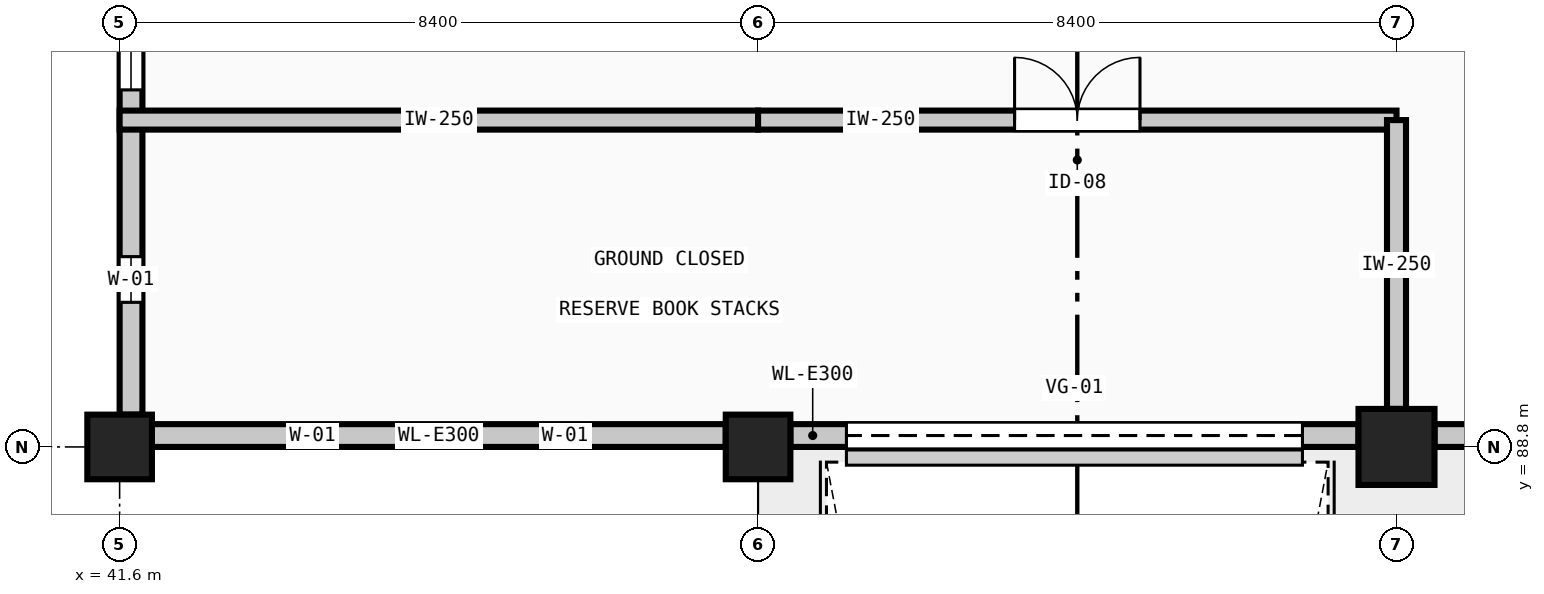
"""IFC4 building model, lengths in metres.
Left out: names, types, materials, properties, quantities, classifications, styles, units other than length and angle.
Written with IfcOpenShell. Run it as: python <this file> out.ifc"""

import sys

from ifc_helpers import new_model, si_unit, direction, frame, frame_2d, origin, origin_2d, place, context, subcontext, project, spatial, rectangle, extrude, element, fill, save


model = new_model("IFC4")
c1 = context("Model", 3, precision=1e-05, world=origin(), true_north=direction((0.0, 1.0)))
c2 = subcontext(c1, "Body", "Model", "MODEL_VIEW")
j1 = project(units=[si_unit("LENGTHUNIT", "METRE"), si_unit("PLANEANGLEUNIT", "RADIAN")], contexts=[c1])
p1 = place(None, origin())
s1 = spatial("IfcSite", under=j1, at=p1, CompositionType="ELEMENT")
p2 = place(p1, origin())
s2 = spatial("IfcBuilding", under=s1, at=p2, CompositionType="ELEMENT")
p3 = place(p2, origin())
s3 = spatial("IfcBuildingStorey", under=s2, at=p3, CompositionType="ELEMENT", Elevation=0.0)
for number, where, z_axis, x_axis in (
    (1, (41.6, 88.8, 0.0), (0.0, 0.0, 1.0), (1.0, 0.0, 0.0)),
    (2, (50.0, 88.8, 0.0), (0.0, 0.0, 1.0), (1.0, 0.0, 0.0)),
):
    element("IfcColumn", number, at=place(p3, frame(where, z_axis=z_axis, x_axis=x_axis)), inside=s3, PredefinedType="COLUMN", context=c2, shape_type="SweptSolid", body=[
        extrude(rectangle(XDim=0.85, YDim=0.85, at=origin_2d()), origin(), (0.0, 0.0, 1.0), 4.8),
    ])
p4 = place(p3, frame((58.4, 88.8, 0.0), z_axis=(0.0, 0.0, 1.0), x_axis=(1.0, 0.0, 0.0)))
e3 = element("IfcColumn", 3, at=p4, inside=s3, PredefinedType="COLUMN", context=c2, shape_type="SweptSolid", body=[
    extrude(rectangle(XDim=1.0, YDim=1.0, at=origin_2d()), origin(), (0.0, 0.0, 1.0), 4.8),
])
p5 = place(p3, frame((66.3, 88.95, 0.0), z_axis=(0.0, 0.0, 1.0), x_axis=(-1.0, 0.0, 0.0)))
e4 = element("IfcWall", 4, at=p5, inside=s3, PredefinedType="SOLIDWALL", context=c2, shape_type="SweptSolid", body=[
    extrude(rectangle(XDim=7.4, YDim=0.3, at=frame_2d((3.7, 0.0))), origin(), (0.0, 0.0, 1.0), 3.85),
])
p6 = place(p5, frame((1.772, 0.0, 0.9)))
e5 = element("IfcOpeningElement", 5, at=p6, cuts=e4, PredefinedType="OPENING", context=c2, shape_type="SweptSolid", body=[
    extrude(rectangle(XDim=0.6, YDim=2.4, at=frame_2d((0.3, 1.2))), frame((0.0, 0.16, 0.0), z_axis=(0.0, -1.0, 0.0), x_axis=(1.0, 0.0, 0.0)), (0.0, 0.0, 1.0), 0.32),
])
p7 = place(p5, frame((5.028, 0.0, 0.9)))
e6 = element("IfcOpeningElement", 6, at=p7, cuts=e4, PredefinedType="OPENING", context=c2, shape_type="SweptSolid", body=[
    extrude(rectangle(XDim=0.6, YDim=2.4, at=frame_2d((0.3, 1.2))), frame((0.0, 0.16, 0.0), z_axis=(0.0, -1.0, 0.0), x_axis=(1.0, 0.0, 0.0)), (0.0, 0.0, 1.0), 0.32),
])
p8 = place(p3, frame((57.9, 88.95, 0.0), z_axis=(0.0, 0.0, 1.0), x_axis=(-1.0, 0.0, 0.0)))
e7 = element("IfcWall", 7, at=p8, inside=s3, PredefinedType="SOLIDWALL", context=c2, shape_type="SweptSolid", body=[
    extrude(rectangle(XDim=7.475, YDim=0.3, at=frame_2d((3.737, 0.0))), origin(), (0.0, 0.0, 1.0), 3.325),
])
p9 = place(p8, frame((0.738, 0.0, 0.0)))
e8 = element("IfcOpeningElement", 8, at=p9, cuts=e7, PredefinedType="OPENING", context=c2, shape_type="SweptSolid", body=[
    extrude(rectangle(XDim=6.0, YDim=3.2, at=frame_2d((3.0, 1.6))), frame((0.0, 0.16, 0.0), z_axis=(0.0, -1.0, 0.0), x_axis=(1.0, 0.0, 0.0)), (0.0, 0.0, 1.0), 0.32),
])
p10 = place(p3, frame((49.575, 88.95, 0.0), z_axis=(0.0, 0.0, 1.0), x_axis=(-1.0, 0.0, 0.0)))
e9 = element("IfcWall", 9, at=p10, inside=s3, PredefinedType="SOLIDWALL", context=c2, shape_type="SweptSolid", body=[
    extrude(rectangle(XDim=7.55, YDim=0.3, at=frame_2d((3.775, 0.0))), origin(), (0.0, 0.0, 1.0), 4.525),
])
p11 = place(p10, frame((1.814, 0.0, 0.9)))
e10 = element("IfcOpeningElement", 10, at=p11, cuts=e9, PredefinedType="OPENING", context=c2, shape_type="SweptSolid", body=[
    extrude(rectangle(XDim=0.6, YDim=2.4, at=frame_2d((0.3, 1.2))), frame((0.0, 0.16, 0.0), z_axis=(0.0, -1.0, 0.0), x_axis=(1.0, 0.0, 0.0)), (0.0, 0.0, 1.0), 0.32),
])
p12 = place(p10, frame((5.136, 0.0, 0.9)))
e11 = element("IfcOpeningElement", 11, at=p12, cuts=e9, PredefinedType="OPENING", context=c2, shape_type="SweptSolid", body=[
    extrude(rectangle(XDim=0.6, YDim=2.4, at=frame_2d((0.3, 1.2))), frame((0.0, 0.16, 0.0), z_axis=(0.0, -1.0, 0.0), x_axis=(1.0, 0.0, 0.0)), (0.0, 0.0, 1.0), 0.32),
])
p13 = place(p3, frame((41.75, 89.225, 0.0), z_axis=(0.0, 0.0, 1.0), x_axis=(0.0, 1.0, 0.0)))
e12 = element("IfcWall", 12, at=p13, inside=s3, PredefinedType="SOLIDWALL", context=c2, shape_type="SweptSolid", body=[
    extrude(rectangle(XDim=6.35, YDim=0.3, at=frame_2d((3.175, 0.0))), origin(), (0.0, 0.0, 1.0), 4.525),
])
p14 = place(p13, frame((1.478, 0.0, 0.9)))
e13 = element("IfcOpeningElement", 13, at=p14, cuts=e12, PredefinedType="OPENING", context=c2, shape_type="SweptSolid", body=[
    extrude(rectangle(XDim=0.6, YDim=2.4, at=frame_2d((0.3, 1.2))), frame((0.0, 0.16, 0.0), z_axis=(0.0, -1.0, 0.0), x_axis=(1.0, 0.0, 0.0)), (0.0, 0.0, 1.0), 0.32),
])
p15 = place(p13, frame((4.272, 0.0, 0.9)))
e14 = element("IfcOpeningElement", 14, at=p15, cuts=e12, PredefinedType="OPENING", context=c2, shape_type="SweptSolid", body=[
    extrude(rectangle(XDim=0.6, YDim=2.4, at=frame_2d((0.3, 1.2))), frame((0.0, 0.16, 0.0), z_axis=(0.0, -1.0, 0.0), x_axis=(1.0, 0.0, 0.0)), (0.0, 0.0, 1.0), 0.32),
])
p16 = place(p3, frame((41.6, 93.1, 0.0), z_axis=(0.0, 0.0, 1.0), x_axis=(1.0, 0.0, 0.0)))
e15 = element("IfcWall", 15, at=p16, inside=s3, PredefinedType="SOLIDWALL", context=c2, shape_type="SweptSolid", body=[
    extrude(rectangle(XDim=8.4, YDim=0.25, at=frame_2d((4.2, 0.0))), origin(), (0.0, 0.0, 1.0), 4.525),
])
p17 = place(p3, frame((50.0, 93.1, 0.0), z_axis=(0.0, 0.0, 1.0), x_axis=(1.0, 0.0, 0.0)))
e16 = element("IfcWall", 16, at=p17, inside=s3, PredefinedType="SOLIDWALL", context=c2, shape_type="SweptSolid", body=[
    extrude(rectangle(XDim=8.4, YDim=0.25, at=frame_2d((4.2, 0.0))), origin(), (0.0, 0.0, 1.0), 4.525),
])
p18 = place(p17, frame((3.375, 0.0, 0.0)))
e17 = element("IfcOpeningElement", 17, at=p18, cuts=e16, PredefinedType="OPENING", context=c2, shape_type="SweptSolid", body=[
    extrude(rectangle(XDim=1.65, YDim=2.25, at=frame_2d((0.825, 1.125))), frame((0.0, 0.135, 0.0), z_axis=(0.0, -1.0, 0.0), x_axis=(1.0, 0.0, 0.0)), (0.0, 0.0, 1.0), 0.27),
])
p19 = place(p3, frame((58.4, 93.1, 0.0), z_axis=(0.0, 0.0, 1.0), x_axis=(0.0, -1.0, 0.0)))
e18 = element("IfcWall", 18, at=p19, inside=s3, PredefinedType="SOLIDWALL", context=c2, shape_type="SweptSolid", body=[
    extrude(rectangle(XDim=3.8, YDim=0.25, at=frame_2d((1.9, 0.0))), origin(), (0.0, 0.0, 1.0), 3.85),
])
p20 = place(p9, origin())
e19 = element("IfcDoor", 19, at=p20, inside=s3, OperationType="ROLLINGUP", PredefinedType="GATE", context=c2, shape_type="SweptSolid", body=[
    extrude(rectangle(XDim=6.0, YDim=3.2, at=frame_2d((3.0, 1.6))), frame((0.0, 0.025, 0.0), z_axis=(0.0, -1.0, 0.0), x_axis=(1.0, 0.0, 0.0)), (0.0, 0.0, 1.0), 0.05),
])
fill(e8, e19)
p21 = place(p11, origin())
e20 = element("IfcWindow", 20, at=p21, inside=s3, PartitioningType="SINGLE_PANEL", PredefinedType="WINDOW", context=c2, shape_type="SweptSolid", body=[
    extrude(rectangle(XDim=0.6, YDim=2.4, at=frame_2d((0.3, 1.2))), frame((0.0, 0.03, 0.0), z_axis=(0.0, -1.0, 0.0), x_axis=(1.0, 0.0, 0.0)), (0.0, 0.0, 1.0), 0.06),
])
fill(e10, e20)
p22 = place(p12, origin())
e21 = element("IfcWindow", 21, at=p22, inside=s3, PartitioningType="SINGLE_PANEL", PredefinedType="WINDOW", context=c2, shape_type="SweptSolid", body=[
    extrude(rectangle(XDim=0.6, YDim=2.4, at=frame_2d((0.3, 1.2))), frame((0.0, 0.03, 0.0), z_axis=(0.0, -1.0, 0.0), x_axis=(1.0, 0.0, 0.0)), (0.0, 0.0, 1.0), 0.06),
])
fill(e11, e21)
p23 = place(p14, origin())
e22 = element("IfcWindow", 22, at=p23, inside=s3, PartitioningType="SINGLE_PANEL", PredefinedType="WINDOW", context=c2, shape_type="SweptSolid", body=[
    extrude(rectangle(XDim=0.6, YDim=2.4, at=frame_2d((0.3, 1.2))), frame((0.0, 0.03, 0.0), z_axis=(0.0, -1.0, 0.0), x_axis=(1.0, 0.0, 0.0)), (0.0, 0.0, 1.0), 0.06),
])
fill(e13, e22)
p24 = place(p15, origin())
e23 = element("IfcWindow", 23, at=p24, inside=s3, PartitioningType="SINGLE_PANEL", PredefinedType="WINDOW", context=c2, shape_type="SweptSolid", body=[
    extrude(rectangle(XDim=0.6, YDim=2.4, at=frame_2d((0.3, 1.2))), frame((0.0, 0.03, 0.0), z_axis=(0.0, -1.0, 0.0), x_axis=(1.0, 0.0, 0.0)), (0.0, 0.0, 1.0), 0.06),
])
fill(e14, e23)
p25 = place(p18, origin())
e24 = element("IfcDoor", 24, at=p25, inside=s3, OperationType="DOUBLE_DOOR_SINGLE_SWING", PredefinedType="DOOR", context=c2, shape_type="SweptSolid", body=[
    extrude(rectangle(XDim=1.65, YDim=2.25, at=frame_2d((0.825, 1.125))), frame((0.0, 0.025, 0.0), z_axis=(0.0, -1.0, 0.0), x_axis=(1.0, 0.0, 0.0)), (0.0, 0.0, 1.0), 0.05),
])
fill(e17, e24)
save(model, sys.argv[1])
